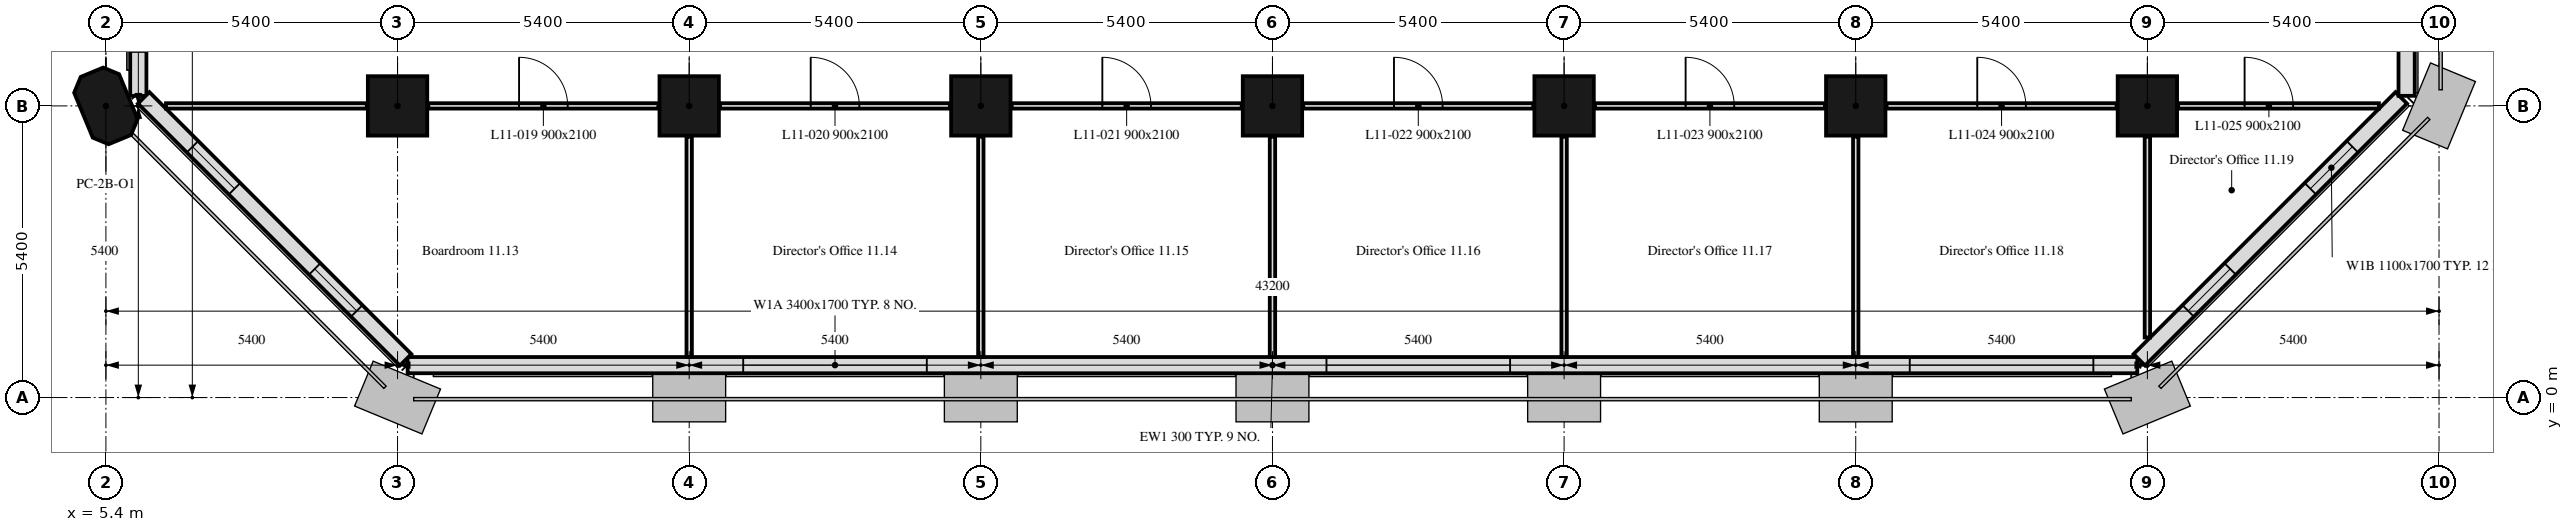
"""IFC4 building model, lengths in metres.
Left out: names, types, materials, properties, quantities, classifications, styles, units other than length and angle.
Written with IfcOpenShell. Run it as: python <this file> out.ifc"""

import sys

from ifc_helpers import new_model, si_unit, direction, frame, frame_2d, origin, origin_2d, place, context, subcontext, project, spatial, polyline, rectangle, outline, extrude, element, fill, save


model = new_model("IFC4")
c1 = context("Model", 3, precision=1e-05, world=origin(), true_north=direction((0.0, 1.0)))
c2 = subcontext(c1, "Body", "Model", "MODEL_VIEW")
j1 = project(units=[si_unit("LENGTHUNIT", "METRE"), si_unit("PLANEANGLEUNIT", "RADIAN")], contexts=[c1])
p1 = place(None, origin())
s1 = spatial("IfcSite", under=j1, at=p1, CompositionType="ELEMENT")
p2 = place(p1, origin())
s2 = spatial("IfcBuilding", under=s1, at=p2, CompositionType="ELEMENT")
p3 = place(p2, frame((0.0, 0.0, 52.6)))
s3 = spatial("IfcBuildingStorey", under=s2, at=p3, CompositionType="ELEMENT", Elevation=52.6)
p4 = place(p3, frame((5.4, 5.4, 0.0), z_axis=(0.0, 0.0, 1.0), x_axis=(-0.382683432365, 0.923879532511, 0.0)))
e1 = element("IfcColumn", 1, at=p4, inside=s3, PredefinedType="COLUMN", context=c2, shape_type="SweptSolid", body=[
    extrude(outline(polyline([(-0.45, -0.45), (0.45, -0.45), (0.675, -0.225), (0.675, 0.225), (0.45, 0.45), (-0.45, 0.45), (-0.675, 0.225), (-0.675, -0.225), (-0.45, -0.45)])), origin(), (0.0, 0.0, 1.0), 3.5),
])
for number, where, z_axis, x_axis in (
    (2, (10.8, 5.4, 0.0), (0.0, 0.0, 1.0), (1.0, 0.0, 0.0)),
    (3, (16.2, 5.4, 0.0), (0.0, 0.0, 1.0), (1.0, 0.0, 0.0)),
    (4, (21.6, 5.4, 0.0), (0.0, 0.0, 1.0), (1.0, 0.0, 0.0)),
    (5, (27.0, 5.4, 0.0), (0.0, 0.0, 1.0), (1.0, 0.0, 0.0)),
    (6, (32.4, 5.4, 0.0), (0.0, 0.0, 1.0), (1.0, 0.0, 0.0)),
    (7, (37.8, 5.4, 0.0), (0.0, 0.0, 1.0), (1.0, 0.0, 0.0)),
    (8, (43.2, 5.4, 0.0), (0.0, 0.0, 1.0), (1.0, 0.0, 0.0)),
):
    element("IfcColumn", number, at=place(p3, frame(where, z_axis=z_axis, x_axis=x_axis)), inside=s3, PredefinedType="COLUMN", context=c2, shape_type="SweptSolid", body=[
        extrude(rectangle(XDim=1.1, YDim=1.1, at=origin_2d()), origin(), (0.0, 0.0, 1.0), 3.5),
    ])
p5 = place(p3, frame((10.986, 0.6, 0.0), z_axis=(0.0, 0.0, 1.0), x_axis=(1.0, 0.0, 0.0)))
e9 = element("IfcWall", 9, at=p5, inside=s3, PredefinedType="SOLIDWALL", context=c2, shape_type="SweptSolid", body=[
    extrude(rectangle(XDim=32.027, YDim=0.3, at=frame_2d((16.014, 0.0))), origin(), (0.0, 0.0, 1.0), 3.5),
])
p6 = place(p5, frame((6.214, 0.0, 0.9)))
e10 = element("IfcOpeningElement", 10, at=p6, cuts=e9, PredefinedType="OPENING", context=c2, shape_type="SweptSolid", body=[
    extrude(rectangle(XDim=3.4, YDim=1.7, at=frame_2d((1.7, 0.85))), frame((0.0, 0.16, 0.0), z_axis=(0.0, -1.0, 0.0), x_axis=(1.0, 0.0, 0.0)), (0.0, 0.0, 1.0), 0.32),
])
p7 = place(p5, frame((17.014, 0.0, 0.9)))
e11 = element("IfcOpeningElement", 11, at=p7, cuts=e9, PredefinedType="OPENING", context=c2, shape_type="SweptSolid", body=[
    extrude(rectangle(XDim=3.4, YDim=1.7, at=frame_2d((1.7, 0.85))), frame((0.0, 0.16, 0.0), z_axis=(0.0, -1.0, 0.0), x_axis=(1.0, 0.0, 0.0)), (0.0, 0.0, 1.0), 0.32),
])
p8 = place(p5, frame((27.814, 0.0, 0.9)))
e12 = element("IfcOpeningElement", 12, at=p8, cuts=e9, PredefinedType="OPENING", context=c2, shape_type="SweptSolid", body=[
    extrude(rectangle(XDim=3.4, YDim=1.7, at=frame_2d((1.7, 0.85))), frame((0.0, 0.16, 0.0), z_axis=(0.0, -1.0, 0.0), x_axis=(1.0, 0.0, 0.0)), (0.0, 0.0, 1.0), 0.32),
])
p9 = place(p3, frame((43.051, 0.699, 0.0), z_axis=(0.0, 0.0, 1.0), x_axis=(0.707106781187, 0.707106781187, 0.0)))
e13 = element("IfcWall", 13, at=p9, inside=s3, PredefinedType="SOLIDWALL", context=c2, shape_type="SweptSolid", body=[
    extrude(rectangle(XDim=6.86, YDim=0.3, at=frame_2d((3.43, 0.0))), origin(), (0.0, 0.0, 1.0), 3.5),
])
p10 = place(p9, frame((1.28, 0.0, 0.9)))
e14 = element("IfcOpeningElement", 14, at=p10, cuts=e13, PredefinedType="OPENING", context=c2, shape_type="SweptSolid", body=[
    extrude(rectangle(XDim=1.1, YDim=1.7, at=frame_2d((0.55, 0.85))), frame((0.0, 0.16, 0.0), z_axis=(0.0, -1.0, 0.0), x_axis=(1.0, 0.0, 0.0)), (0.0, 0.0, 1.0), 0.32),
])
p11 = place(p9, frame((4.48, 0.0, 0.9)))
e15 = element("IfcOpeningElement", 15, at=p11, cuts=e13, PredefinedType="OPENING", context=c2, shape_type="SweptSolid", body=[
    extrude(rectangle(XDim=1.1, YDim=1.7, at=frame_2d((0.55, 0.85))), frame((0.0, 0.16, 0.0), z_axis=(0.0, -1.0, 0.0), x_axis=(1.0, 0.0, 0.0)), (0.0, 0.0, 1.0), 0.32),
])
p12 = place(p3, frame((48.0, 5.586, 0.0), z_axis=(0.0, 0.0, 1.0), x_axis=(0.0, 1.0, 0.0)))
e16 = element("IfcWall", 16, at=p12, inside=s3, PredefinedType="SOLIDWALL", context=c2, shape_type="SweptSolid", body=[
    extrude(rectangle(XDim=32.027, YDim=0.3, at=frame_2d((16.014, 0.0))), origin(), (0.0, 0.0, 1.0), 3.5),
])
p13 = place(p12, frame((6.564, 0.0, 0.9)))
e17 = element("IfcOpeningElement", 17, at=p13, cuts=e16, PredefinedType="OPENING", context=c2, shape_type="SweptSolid", body=[
    extrude(rectangle(XDim=1.1, YDim=1.7, at=frame_2d((0.55, 0.85))), frame((0.0, 0.16, 0.0), z_axis=(0.0, -1.0, 0.0), x_axis=(1.0, 0.0, 0.0)), (0.0, 0.0, 1.0), 0.32),
])
p14 = place(p12, frame((8.164, 0.0, 0.9)))
e18 = element("IfcOpeningElement", 18, at=p14, cuts=e16, PredefinedType="OPENING", context=c2, shape_type="SweptSolid", body=[
    extrude(rectangle(XDim=1.1, YDim=1.7, at=frame_2d((0.55, 0.85))), frame((0.0, 0.16, 0.0), z_axis=(0.0, -1.0, 0.0), x_axis=(1.0, 0.0, 0.0)), (0.0, 0.0, 1.0), 0.32),
])
p15 = place(p12, frame((17.014, 0.0, 0.9)))
e19 = element("IfcOpeningElement", 19, at=p15, cuts=e16, PredefinedType="OPENING", context=c2, shape_type="SweptSolid", body=[
    extrude(rectangle(XDim=3.4, YDim=1.7, at=frame_2d((1.7, 0.85))), frame((0.0, 0.16, 0.0), z_axis=(0.0, -1.0, 0.0), x_axis=(1.0, 0.0, 0.0)), (0.0, 0.0, 1.0), 0.32),
])
p16 = place(p12, frame((28.164, 0.0, 0.9)))
e20 = element("IfcOpeningElement", 20, at=p16, cuts=e16, PredefinedType="OPENING", context=c2, shape_type="SweptSolid", body=[
    extrude(rectangle(XDim=1.1, YDim=1.7, at=frame_2d((0.55, 0.85))), frame((0.0, 0.16, 0.0), z_axis=(0.0, -1.0, 0.0), x_axis=(1.0, 0.0, 0.0)), (0.0, 0.0, 1.0), 0.32),
])
p17 = place(p12, frame((29.764, 0.0, 0.9)))
e21 = element("IfcOpeningElement", 21, at=p17, cuts=e16, PredefinedType="OPENING", context=c2, shape_type="SweptSolid", body=[
    extrude(rectangle(XDim=1.1, YDim=1.7, at=frame_2d((0.55, 0.85))), frame((0.0, 0.16, 0.0), z_axis=(0.0, -1.0, 0.0), x_axis=(1.0, 0.0, 0.0)), (0.0, 0.0, 1.0), 0.32),
])
p18 = place(p3, frame((6.0, 16.2, 0.0), z_axis=(0.0, 0.0, 1.0), x_axis=(0.0, -1.0, 0.0)))
e22 = element("IfcWall", 22, at=p18, inside=s3, PredefinedType="SOLIDWALL", context=c2, shape_type="SweptSolid", body=[
    extrude(rectangle(XDim=10.614, YDim=0.3, at=frame_2d((5.307, 0.0))), origin(), (0.0, 0.0, 1.0), 3.5),
])
p19 = place(p18, frame((6.4, 0.0, 0.9)))
e23 = element("IfcOpeningElement", 23, at=p19, cuts=e22, PredefinedType="OPENING", context=c2, shape_type="SweptSolid", body=[
    extrude(rectangle(XDim=3.4, YDim=1.7, at=frame_2d((1.7, 0.85))), frame((0.0, 0.16, 0.0), z_axis=(0.0, -1.0, 0.0), x_axis=(1.0, 0.0, 0.0)), (0.0, 0.0, 1.0), 0.32),
])
p20 = place(p3, frame((6.099, 5.55, 0.0), z_axis=(0.0, 0.0, 1.0), x_axis=(0.707106781187, -0.707106781187, 0.0)))
e24 = element("IfcWall", 24, at=p20, inside=s3, PredefinedType="SOLIDWALL", context=c2, shape_type="SweptSolid", body=[
    extrude(rectangle(XDim=6.86, YDim=0.3, at=frame_2d((3.43, 0.0))), origin(), (0.0, 0.0, 1.0), 3.5),
])
p21 = place(p20, frame((1.28, 0.0, 0.9)))
e25 = element("IfcOpeningElement", 25, at=p21, cuts=e24, PredefinedType="OPENING", context=c2, shape_type="SweptSolid", body=[
    extrude(rectangle(XDim=1.1, YDim=1.7, at=frame_2d((0.55, 0.85))), frame((0.0, 0.16, 0.0), z_axis=(0.0, -1.0, 0.0), x_axis=(1.0, 0.0, 0.0)), (0.0, 0.0, 1.0), 0.32),
])
p22 = place(p20, frame((4.48, 0.0, 0.9)))
e26 = element("IfcOpeningElement", 26, at=p22, cuts=e24, PredefinedType="OPENING", context=c2, shape_type="SweptSolid", body=[
    extrude(rectangle(XDim=1.1, YDim=1.7, at=frame_2d((0.55, 0.85))), frame((0.0, 0.16, 0.0), z_axis=(0.0, -1.0, 0.0), x_axis=(1.0, 0.0, 0.0)), (0.0, 0.0, 1.0), 0.32),
])
p23 = place(p3, frame((6.512, 5.4, 0.0), z_axis=(0.0, 0.0, 1.0), x_axis=(1.0, 0.0, 0.0)))
e27 = element("IfcWall", 27, at=p23, inside=s3, PredefinedType="PARTITIONING", context=c2, shape_type="SweptSolid", body=[
    extrude(rectangle(XDim=3.718, YDim=0.1, at=frame_2d((1.859, 0.0))), origin(), (0.0, 0.0, 1.0), 3.5),
])
p24 = place(p3, frame((11.37, 5.4, 0.0), z_axis=(0.0, 0.0, 1.0), x_axis=(1.0, 0.0, 0.0)))
e28 = element("IfcWall", 28, at=p24, inside=s3, PredefinedType="PARTITIONING", context=c2, shape_type="SweptSolid", body=[
    extrude(rectangle(XDim=4.26, YDim=0.1, at=frame_2d((2.13, 0.0))), origin(), (0.0, 0.0, 1.0), 3.5),
])
p25 = place(p24, frame((1.68, 0.0, 0.0)))
e29 = element("IfcOpeningElement", 29, at=p25, cuts=e28, PredefinedType="OPENING", context=c2, shape_type="SweptSolid", body=[
    extrude(rectangle(XDim=0.9, YDim=2.1, at=frame_2d((0.45, 1.05))), frame((0.0, 0.05, 0.0), z_axis=(0.0, -1.0, 0.0), x_axis=(1.0, 0.0, 0.0)), (0.0, 0.0, 1.0), 0.1),
])
p26 = place(p3, frame((16.77, 5.4, 0.0), z_axis=(0.0, 0.0, 1.0), x_axis=(1.0, 0.0, 0.0)))
e30 = element("IfcWall", 30, at=p26, inside=s3, PredefinedType="PARTITIONING", context=c2, shape_type="SweptSolid", body=[
    extrude(rectangle(XDim=4.26, YDim=0.1, at=frame_2d((2.13, 0.0))), origin(), (0.0, 0.0, 1.0), 3.5),
])
p27 = place(p26, frame((1.68, 0.0, 0.0)))
e31 = element("IfcOpeningElement", 31, at=p27, cuts=e30, PredefinedType="OPENING", context=c2, shape_type="SweptSolid", body=[
    extrude(rectangle(XDim=0.9, YDim=2.1, at=frame_2d((0.45, 1.05))), frame((0.0, 0.05, 0.0), z_axis=(0.0, -1.0, 0.0), x_axis=(1.0, 0.0, 0.0)), (0.0, 0.0, 1.0), 0.1),
])
p28 = place(p3, frame((22.17, 5.4, 0.0), z_axis=(0.0, 0.0, 1.0), x_axis=(1.0, 0.0, 0.0)))
e32 = element("IfcWall", 32, at=p28, inside=s3, PredefinedType="PARTITIONING", context=c2, shape_type="SweptSolid", body=[
    extrude(rectangle(XDim=4.26, YDim=0.1, at=frame_2d((2.13, 0.0))), origin(), (0.0, 0.0, 1.0), 3.5),
])
p29 = place(p28, frame((1.68, 0.0, 0.0)))
e33 = element("IfcOpeningElement", 33, at=p29, cuts=e32, PredefinedType="OPENING", context=c2, shape_type="SweptSolid", body=[
    extrude(rectangle(XDim=0.9, YDim=2.1, at=frame_2d((0.45, 1.05))), frame((0.0, 0.05, 0.0), z_axis=(0.0, -1.0, 0.0), x_axis=(1.0, 0.0, 0.0)), (0.0, 0.0, 1.0), 0.1),
])
p30 = place(p3, frame((27.57, 5.4, 0.0), z_axis=(0.0, 0.0, 1.0), x_axis=(1.0, 0.0, 0.0)))
e34 = element("IfcWall", 34, at=p30, inside=s3, PredefinedType="PARTITIONING", context=c2, shape_type="SweptSolid", body=[
    extrude(rectangle(XDim=4.26, YDim=0.1, at=frame_2d((2.13, 0.0))), origin(), (0.0, 0.0, 1.0), 3.5),
])
p31 = place(p30, frame((1.68, 0.0, 0.0)))
e35 = element("IfcOpeningElement", 35, at=p31, cuts=e34, PredefinedType="OPENING", context=c2, shape_type="SweptSolid", body=[
    extrude(rectangle(XDim=0.9, YDim=2.1, at=frame_2d((0.45, 1.05))), frame((0.0, 0.05, 0.0), z_axis=(0.0, -1.0, 0.0), x_axis=(1.0, 0.0, 0.0)), (0.0, 0.0, 1.0), 0.1),
])
p32 = place(p3, frame((32.97, 5.4, 0.0), z_axis=(0.0, 0.0, 1.0), x_axis=(1.0, 0.0, 0.0)))
e36 = element("IfcWall", 36, at=p32, inside=s3, PredefinedType="PARTITIONING", context=c2, shape_type="SweptSolid", body=[
    extrude(rectangle(XDim=4.26, YDim=0.1, at=frame_2d((2.13, 0.0))), origin(), (0.0, 0.0, 1.0), 3.5),
])
p33 = place(p32, frame((1.68, 0.0, 0.0)))
e37 = element("IfcOpeningElement", 37, at=p33, cuts=e36, PredefinedType="OPENING", context=c2, shape_type="SweptSolid", body=[
    extrude(rectangle(XDim=0.9, YDim=2.1, at=frame_2d((0.45, 1.05))), frame((0.0, 0.05, 0.0), z_axis=(0.0, -1.0, 0.0), x_axis=(1.0, 0.0, 0.0)), (0.0, 0.0, 1.0), 0.1),
])
p34 = place(p3, frame((38.37, 5.4, 0.0), z_axis=(0.0, 0.0, 1.0), x_axis=(1.0, 0.0, 0.0)))
e38 = element("IfcWall", 38, at=p34, inside=s3, PredefinedType="PARTITIONING", context=c2, shape_type="SweptSolid", body=[
    extrude(rectangle(XDim=4.26, YDim=0.1, at=frame_2d((2.13, 0.0))), origin(), (0.0, 0.0, 1.0), 3.5),
])
p35 = place(p34, frame((1.68, 0.0, 0.0)))
e39 = element("IfcOpeningElement", 39, at=p35, cuts=e38, PredefinedType="OPENING", context=c2, shape_type="SweptSolid", body=[
    extrude(rectangle(XDim=0.9, YDim=2.1, at=frame_2d((0.45, 1.05))), frame((0.0, 0.05, 0.0), z_axis=(0.0, -1.0, 0.0), x_axis=(1.0, 0.0, 0.0)), (0.0, 0.0, 1.0), 0.1),
])
p36 = place(p3, frame((43.77, 5.4, 0.0), z_axis=(0.0, 0.0, 1.0), x_axis=(1.0, 0.0, 0.0)))
e40 = element("IfcWall", 40, at=p36, inside=s3, PredefinedType="PARTITIONING", context=c2, shape_type="SweptSolid", body=[
    extrude(rectangle(XDim=3.718, YDim=0.1, at=frame_2d((1.859, 0.0))), origin(), (0.0, 0.0, 1.0), 3.5),
])
p37 = place(p36, frame((1.23, 0.0, 0.0)))
e41 = element("IfcOpeningElement", 41, at=p37, cuts=e40, PredefinedType="OPENING", context=c2, shape_type="SweptSolid", body=[
    extrude(rectangle(XDim=0.9, YDim=2.1, at=frame_2d((0.45, 1.05))), frame((0.0, 0.05, 0.0), z_axis=(0.0, -1.0, 0.0), x_axis=(1.0, 0.0, 0.0)), (0.0, 0.0, 1.0), 0.1),
])
for number, where, z_axis, x_axis in (
    (42, (16.2, 0.751, 0.0), (0.0, 0.0, 1.0), (0.0, 1.0, 0.0)),
    (43, (21.6, 0.751, 0.0), (0.0, 0.0, 1.0), (0.0, 1.0, 0.0)),
    (44, (27.0, 0.751, 0.0), (0.0, 0.0, 1.0), (0.0, 1.0, 0.0)),
    (45, (32.4, 0.751, 0.0), (0.0, 0.0, 1.0), (0.0, 1.0, 0.0)),
    (46, (37.8, 0.751, 0.0), (0.0, 0.0, 1.0), (0.0, 1.0, 0.0)),
):
    element("IfcWall", number, at=place(p3, frame(where, z_axis=z_axis, x_axis=x_axis)), inside=s3, PredefinedType="PARTITIONING", context=c2, shape_type="SweptSolid", body=[
        extrude(rectangle(XDim=4.079, YDim=0.1, at=frame_2d((2.04, 0.0))), origin(), (0.0, 0.0, 1.0), 2.75),
    ])
p38 = place(p3, frame((43.2, 1.112, 0.0), z_axis=(0.0, 0.0, 1.0), x_axis=(0.0, 1.0, 0.0)))
e47 = element("IfcWall", 47, at=p38, inside=s3, PredefinedType="PARTITIONING", context=c2, shape_type="SweptSolid", body=[
    extrude(rectangle(XDim=3.718, YDim=0.1, at=frame_2d((1.859, 0.0))), origin(), (0.0, 0.0, 1.0), 3.5),
])
p39 = place(p6, origin())
e48 = element("IfcWindow", 48, at=p39, inside=s3, PartitioningType="SINGLE_PANEL", PredefinedType="WINDOW", context=c2, shape_type="SweptSolid", body=[
    extrude(rectangle(XDim=3.4, YDim=1.7, at=frame_2d((1.7, 0.85))), frame((0.0, 0.03, 0.0), z_axis=(0.0, -1.0, 0.0), x_axis=(1.0, 0.0, 0.0)), (0.0, 0.0, 1.0), 0.06),
])
fill(e10, e48)
p40 = place(p7, origin())
e49 = element("IfcWindow", 49, at=p40, inside=s3, PartitioningType="SINGLE_PANEL", PredefinedType="WINDOW", context=c2, shape_type="SweptSolid", body=[
    extrude(rectangle(XDim=3.4, YDim=1.7, at=frame_2d((1.7, 0.85))), frame((0.0, 0.03, 0.0), z_axis=(0.0, -1.0, 0.0), x_axis=(1.0, 0.0, 0.0)), (0.0, 0.0, 1.0), 0.06),
])
fill(e11, e49)
p41 = place(p8, origin())
e50 = element("IfcWindow", 50, at=p41, inside=s3, PartitioningType="SINGLE_PANEL", PredefinedType="WINDOW", context=c2, shape_type="SweptSolid", body=[
    extrude(rectangle(XDim=3.4, YDim=1.7, at=frame_2d((1.7, 0.85))), frame((0.0, 0.03, 0.0), z_axis=(0.0, -1.0, 0.0), x_axis=(1.0, 0.0, 0.0)), (0.0, 0.0, 1.0), 0.06),
])
fill(e12, e50)
p42 = place(p10, origin())
e51 = element("IfcWindow", 51, at=p42, inside=s3, PartitioningType="SINGLE_PANEL", PredefinedType="WINDOW", context=c2, shape_type="SweptSolid", body=[
    extrude(rectangle(XDim=1.1, YDim=1.7, at=frame_2d((0.55, 0.85))), frame((0.0, 0.03, 0.0), z_axis=(0.0, -1.0, 0.0), x_axis=(1.0, 0.0, 0.0)), (0.0, 0.0, 1.0), 0.06),
])
fill(e14, e51)
p43 = place(p11, origin())
e52 = element("IfcWindow", 52, at=p43, inside=s3, PartitioningType="SINGLE_PANEL", PredefinedType="WINDOW", context=c2, shape_type="SweptSolid", body=[
    extrude(rectangle(XDim=1.1, YDim=1.7, at=frame_2d((0.55, 0.85))), frame((0.0, 0.03, 0.0), z_axis=(0.0, -1.0, 0.0), x_axis=(1.0, 0.0, 0.0)), (0.0, 0.0, 1.0), 0.06),
])
fill(e15, e52)
p44 = place(p21, origin())
e53 = element("IfcWindow", 53, at=p44, inside=s3, PartitioningType="SINGLE_PANEL", PredefinedType="WINDOW", context=c2, shape_type="SweptSolid", body=[
    extrude(rectangle(XDim=1.1, YDim=1.7, at=frame_2d((0.55, 0.85))), frame((0.0, 0.03, 0.0), z_axis=(0.0, -1.0, 0.0), x_axis=(1.0, 0.0, 0.0)), (0.0, 0.0, 1.0), 0.06),
])
fill(e25, e53)
p45 = place(p22, origin())
e54 = element("IfcWindow", 54, at=p45, inside=s3, PartitioningType="SINGLE_PANEL", PredefinedType="WINDOW", context=c2, shape_type="SweptSolid", body=[
    extrude(rectangle(XDim=1.1, YDim=1.7, at=frame_2d((0.55, 0.85))), frame((0.0, 0.03, 0.0), z_axis=(0.0, -1.0, 0.0), x_axis=(1.0, 0.0, 0.0)), (0.0, 0.0, 1.0), 0.06),
])
fill(e26, e54)
p46 = place(p25, origin())
e55 = element("IfcDoor", 55, at=p46, inside=s3, OperationType="SINGLE_SWING_RIGHT", PredefinedType="DOOR", context=c2, shape_type="SweptSolid", body=[
    extrude(rectangle(XDim=0.9, YDim=2.1, at=frame_2d((0.45, 1.05))), frame((0.0, 0.025, 0.0), z_axis=(0.0, -1.0, 0.0), x_axis=(1.0, 0.0, 0.0)), (0.0, 0.0, 1.0), 0.05),
])
fill(e29, e55)
p47 = place(p27, origin())
e56 = element("IfcDoor", 56, at=p47, inside=s3, OperationType="SINGLE_SWING_RIGHT", PredefinedType="DOOR", context=c2, shape_type="SweptSolid", body=[
    extrude(rectangle(XDim=0.9, YDim=2.1, at=frame_2d((0.45, 1.05))), frame((0.0, 0.025, 0.0), z_axis=(0.0, -1.0, 0.0), x_axis=(1.0, 0.0, 0.0)), (0.0, 0.0, 1.0), 0.05),
])
fill(e31, e56)
p48 = place(p29, origin())
e57 = element("IfcDoor", 57, at=p48, inside=s3, OperationType="SINGLE_SWING_RIGHT", PredefinedType="DOOR", context=c2, shape_type="SweptSolid", body=[
    extrude(rectangle(XDim=0.9, YDim=2.1, at=frame_2d((0.45, 1.05))), frame((0.0, 0.025, 0.0), z_axis=(0.0, -1.0, 0.0), x_axis=(1.0, 0.0, 0.0)), (0.0, 0.0, 1.0), 0.05),
])
fill(e33, e57)
p49 = place(p31, origin())
e58 = element("IfcDoor", 58, at=p49, inside=s3, OperationType="SINGLE_SWING_RIGHT", PredefinedType="DOOR", context=c2, shape_type="SweptSolid", body=[
    extrude(rectangle(XDim=0.9, YDim=2.1, at=frame_2d((0.45, 1.05))), frame((0.0, 0.025, 0.0), z_axis=(0.0, -1.0, 0.0), x_axis=(1.0, 0.0, 0.0)), (0.0, 0.0, 1.0), 0.05),
])
fill(e35, e58)
p50 = place(p33, origin())
e59 = element("IfcDoor", 59, at=p50, inside=s3, OperationType="SINGLE_SWING_LEFT", PredefinedType="DOOR", context=c2, shape_type="SweptSolid", body=[
    extrude(rectangle(XDim=0.9, YDim=2.1, at=frame_2d((0.45, 1.05))), frame((0.0, 0.025, 0.0), z_axis=(0.0, -1.0, 0.0), x_axis=(1.0, 0.0, 0.0)), (0.0, 0.0, 1.0), 0.05),
])
fill(e37, e59)
p51 = place(p35, origin())
e60 = element("IfcDoor", 60, at=p51, inside=s3, OperationType="SINGLE_SWING_LEFT", PredefinedType="DOOR", context=c2, shape_type="SweptSolid", body=[
    extrude(rectangle(XDim=0.9, YDim=2.1, at=frame_2d((0.45, 1.05))), frame((0.0, 0.025, 0.0), z_axis=(0.0, -1.0, 0.0), x_axis=(1.0, 0.0, 0.0)), (0.0, 0.0, 1.0), 0.05),
])
fill(e39, e60)
p52 = place(p37, origin())
e61 = element("IfcDoor", 61, at=p52, inside=s3, OperationType="SINGLE_SWING_LEFT", PredefinedType="DOOR", context=c2, shape_type="SweptSolid", body=[
    extrude(rectangle(XDim=0.9, YDim=2.1, at=frame_2d((0.45, 1.05))), frame((0.0, 0.025, 0.0), z_axis=(0.0, -1.0, 0.0), x_axis=(1.0, 0.0, 0.0)), (0.0, 0.0, 1.0), 0.05),
])
fill(e41, e61)
save(model, sys.argv[1])
